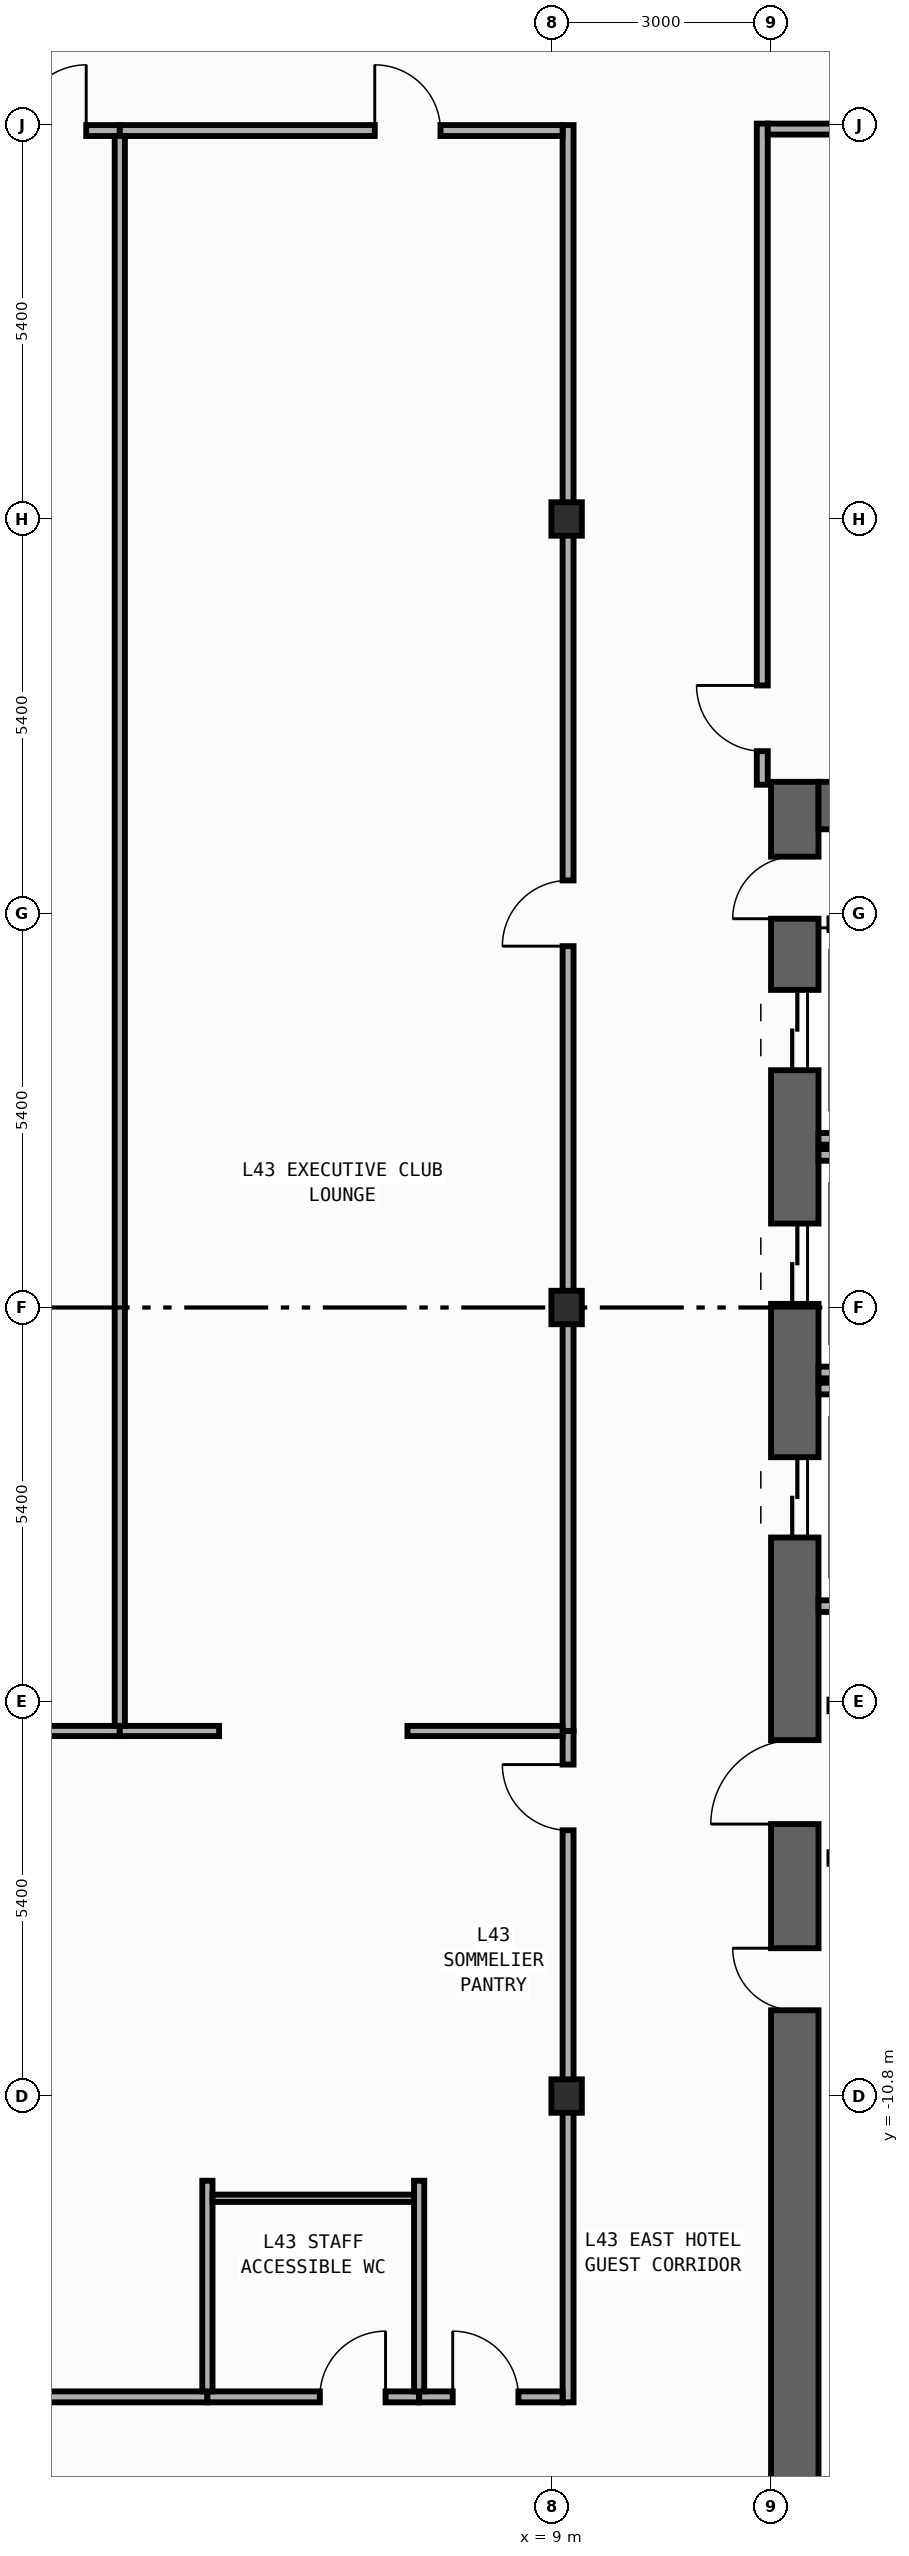
"""IFC4 building model, lengths in metres.
Left out: names, types, materials, properties, quantities, classifications, styles, units other than length and angle.
Written with IfcOpenShell. Run it as: python <this file> out.ifc"""

import sys

from ifc_helpers import new_model, si_unit, direction, frame, frame_2d, origin, origin_2d, place, context, subcontext, project, spatial, rectangle, i_section, extrude, element, fill, save


model = new_model("IFC4")
c1 = context("Model", 3, precision=1e-05, world=origin(), true_north=direction((0.0, 1.0)))
c2 = subcontext(c1, "Body", "Model", "MODEL_VIEW")
j1 = project(units=[si_unit("LENGTHUNIT", "METRE"), si_unit("PLANEANGLEUNIT", "RADIAN")], contexts=[c1])
p1 = place(None, origin())
s1 = spatial("IfcSite", under=j1, at=p1, CompositionType="ELEMENT")
p2 = place(p1, origin())
s2 = spatial("IfcBuilding", under=s1, at=p2, CompositionType="ELEMENT")
p3 = place(p2, frame((0.0, 0.0, 187.8)))
s3 = spatial("IfcBuildingStorey", under=s2, at=p3, CompositionType="ELEMENT", Elevation=187.8)
p4 = place(p3, frame((12.325, -19.8, 0.0), z_axis=(0.0, 0.0, 1.0), x_axis=(0.0, 1.0, 0.0)))
e1 = element("IfcWall", 1, at=p4, inside=s3, PredefinedType="SHEAR", context=c2, shape_type="SweptSolid", body=[
    extrude(rectangle(XDim=27.0, YDim=0.65, at=frame_2d((13.5, 0.0))), origin(), (0.0, 0.0, 1.0), 3.54),
])
p5 = place(p4, frame((23.05, 0.0, 0.0)))
e2 = element("IfcOpeningElement", 2, at=p5, cuts=e1, PredefinedType="OPENING", context=c2, shape_type="SweptSolid", body=[
    extrude(rectangle(XDim=1.1, YDim=2.2, at=frame_2d((0.55, 1.1))), frame((0.0, 0.335, 0.0), z_axis=(0.0, -1.0, 0.0), x_axis=(1.0, 0.0, 0.0)), (0.0, 0.0, 1.0), 0.67),
])
p6 = place(p4, frame((19.85, 0.0, 0.0)))
e3 = element("IfcOpeningElement", 3, at=p6, cuts=e1, PredefinedType="OPENING", context=c2, shape_type="SweptSolid", body=[
    extrude(rectangle(XDim=1.1, YDim=2.2, at=frame_2d((0.55, 1.1))), frame((0.0, 0.335, 0.0), z_axis=(0.0, -1.0, 0.0), x_axis=(1.0, 0.0, 0.0)), (0.0, 0.0, 1.0), 0.67),
])
p7 = place(p4, frame((16.65, 0.0, 0.0)))
e4 = element("IfcOpeningElement", 4, at=p7, cuts=e1, PredefinedType="OPENING", context=c2, shape_type="SweptSolid", body=[
    extrude(rectangle(XDim=1.1, YDim=2.2, at=frame_2d((0.55, 1.1))), frame((0.0, 0.335, 0.0), z_axis=(0.0, -1.0, 0.0), x_axis=(1.0, 0.0, 0.0)), (0.0, 0.0, 1.0), 0.67),
])
p8 = place(p4, frame((10.175, 0.0, 0.0)))
e5 = element("IfcOpeningElement", 5, at=p8, cuts=e1, PredefinedType="OPENING", context=c2, shape_type="SweptSolid", body=[
    extrude(rectangle(XDim=0.85, YDim=2.1, at=frame_2d((0.425, 1.05))), frame((0.0, 0.335, 0.0), z_axis=(0.0, -1.0, 0.0), x_axis=(1.0, 0.0, 0.0)), (0.0, 0.0, 1.0), 0.67),
])
p9 = place(p4, frame((12.725, 0.0, 0.0)))
e6 = element("IfcOpeningElement", 6, at=p9, cuts=e1, PredefinedType="OPENING", context=c2, shape_type="SweptSolid", body=[
    extrude(rectangle(XDim=1.15, YDim=2.2, at=frame_2d((0.575, 1.1))), frame((0.0, 0.335, 0.0), z_axis=(0.0, -1.0, 0.0), x_axis=(1.0, 0.0, 0.0)), (0.0, 0.0, 1.0), 0.67),
])
p10 = place(p4, frame((25.125, 0.0, 0.0)))
e7 = element("IfcOpeningElement", 7, at=p10, cuts=e1, PredefinedType="OPENING", context=c2, shape_type="SweptSolid", body=[
    extrude(rectangle(XDim=0.85, YDim=2.1, at=frame_2d((0.425, 1.05))), frame((0.0, 0.335, 0.0), z_axis=(0.0, -1.0, 0.0), x_axis=(1.0, 0.0, 0.0)), (0.0, 0.0, 1.0), 0.67),
])
p11 = place(p3, frame((12.65, 6.875, 0.0), z_axis=(0.0, 0.0, 1.0), x_axis=(1.0, 0.0, 0.0)))
e8 = element("IfcWall", 8, at=p11, inside=s3, PredefinedType="SHEAR", context=c2, shape_type="SweptSolid", body=[
    extrude(rectangle(XDim=7.1, YDim=0.65, at=frame_2d((3.55, 0.0))), origin(), (0.0, 0.0, 1.0), 3.54),
])
for number, where, z_axis, x_axis in (
    (9, (9.2, -10.8, 0.0), (0.0, 0.0, 1.0), (1.0, 0.0, 0.0)),
    (10, (9.2, 0.0, 0.0), (0.0, 0.0, 1.0), (1.0, 0.0, 0.0)),
    (11, (9.2, 10.8, 0.0), (0.0, 0.0, 1.0), (1.0, 0.0, 0.0)),
):
    element("IfcColumn", number, at=place(p3, frame(where, z_axis=z_axis, x_axis=x_axis)), inside=s3, PredefinedType="COLUMN", context=c2, shape_type="SweptSolid", body=[
        extrude(i_section(OverallWidth=0.417, OverallDepth=0.458, WebThickness=0.03, FlangeThickness=0.05, FilletRadius=0.022, at=origin_2d()), origin(), (0.0, 0.0, 1.0), 3.8),
    ])
for number, where, z_axis, x_axis in (
    (12, (12.65, 2.31, 0.0), (0.0, 0.0, 1.0), (1.0, 0.0, 0.0)),
    (13, (12.65, -0.89, 0.0), (0.0, 0.0, 1.0), (1.0, 0.0, 0.0)),
    (14, (12.65, 2.09, 0.0), (0.0, 0.0, 1.0), (1.0, 0.0, 0.0)),
    (15, (12.65, -4.09, 0.0), (0.0, 0.0, 1.0), (1.0, 0.0, 0.0)),
    (16, (12.65, -1.11, 0.0), (0.0, 0.0, 1.0), (1.0, 0.0, 0.0)),
):
    element("IfcWall", number, at=place(p3, frame(where, z_axis=z_axis, x_axis=x_axis)), inside=s3, PredefinedType="STANDARD", context=c2, shape_type="SweptSolid", body=[
        extrude(rectangle(XDim=2.34, YDim=0.16, at=frame_2d((1.17, 0.0))), origin(), (0.0, 0.0, 1.0), 3.54),
    ])
for number, where, z_axis, x_axis in (
    (17, (12.8, -5.45, 0.0), (0.0, 0.0, 1.0), (1.0, 0.0, 0.0)),
    (18, (12.8, -7.54, 0.0), (0.0, 0.0, 1.0), (1.0, 0.0, 0.0)),
    (19, (12.8, 5.25, 0.0), (0.0, 0.0, 1.0), (1.0, 0.0, 0.0)),
):
    element("IfcWall", number, at=place(p3, frame(where, z_axis=z_axis, x_axis=x_axis)), inside=s3, PredefinedType="STANDARD", context=c2, shape_type="SweptSolid", body=[
        extrude(rectangle(XDim=2.6, YDim=0.16, at=frame_2d((1.3, 0.0))), origin(), (0.0, 0.0, 1.0), 3.54),
    ])
p12 = place(p3, frame((9.22, -14.995, 0.0), z_axis=(0.0, 0.0, 1.0), x_axis=(0.0, 1.0, 0.0)))
e20 = element("IfcWall", 20, at=p12, inside=s3, PredefinedType="PARTITIONING", context=c2, shape_type="SweptSolid", body=[
    extrude(rectangle(XDim=9.195, YDim=0.15, at=frame_2d((4.598, 0.0))), origin(), (0.0, 0.0, 1.0), 2.952),
])
p13 = place(p12, frame((7.835, 0.0, 0.0)))
e21 = element("IfcOpeningElement", 21, at=p13, cuts=e20, PredefinedType="OPENING", context=c2, shape_type="SweptSolid", body=[
    extrude(rectangle(XDim=0.9, YDim=2.15, at=frame_2d((0.45, 1.075))), frame((0.0, 0.085, 0.0), z_axis=(0.0, -1.0, 0.0), x_axis=(1.0, 0.0, 0.0)), (0.0, 0.0, 1.0), 0.17),
])
p14 = place(p3, frame((9.22, -5.8, 0.0), z_axis=(0.0, 0.0, 1.0), x_axis=(0.0, 1.0, 0.0)))
e22 = element("IfcWall", 22, at=p14, inside=s3, PredefinedType="PARTITIONING", context=c2, shape_type="SweptSolid", body=[
    extrude(rectangle(XDim=21.995, YDim=0.15, at=frame_2d((10.998, 0.0))), origin(), (0.0, 0.0, 1.0), 2.952),
])
p15 = place(p14, frame((10.749, 0.0, 0.0)))
e23 = element("IfcOpeningElement", 23, at=p15, cuts=e22, PredefinedType="OPENING", context=c2, shape_type="SweptSolid", body=[
    extrude(rectangle(XDim=0.9, YDim=2.15, at=frame_2d((0.45, 1.075))), frame((0.0, 0.085, 0.0), z_axis=(0.0, -1.0, 0.0), x_axis=(1.0, 0.0, 0.0)), (0.0, 0.0, 1.0), 0.17),
])
p16 = place(p3, frame((11.88, 7.16, 0.0), z_axis=(0.0, 0.0, 1.0), x_axis=(0.0, 1.0, 0.0)))
e24 = element("IfcWall", 24, at=p16, inside=s3, PredefinedType="PARTITIONING", context=c2, shape_type="SweptSolid", body=[
    extrude(rectangle(XDim=9.055, YDim=0.15, at=frame_2d((4.528, 0.0))), origin(), (0.0, 0.0, 1.0), 3.54),
])
p17 = place(p16, frame((0.46, 0.0, 0.0)))
e25 = element("IfcOpeningElement", 25, at=p17, cuts=e24, PredefinedType="OPENING", context=c2, shape_type="SweptSolid", body=[
    extrude(rectangle(XDim=0.9, YDim=2.15, at=frame_2d((0.45, 1.075))), frame((0.0, 0.085, 0.0), z_axis=(0.0, -1.0, 0.0), x_axis=(1.0, 0.0, 0.0)), (0.0, 0.0, 1.0), 0.17),
])
p18 = place(p3, frame((-2.92, 16.12, 0.0), z_axis=(0.0, 0.0, 1.0), x_axis=(1.0, 0.0, 0.0)))
e26 = element("IfcWall", 26, at=p18, inside=s3, PredefinedType="PARTITIONING", context=c2, shape_type="SweptSolid", body=[
    extrude(rectangle(XDim=6.0, YDim=0.15, at=frame_2d((3.0, 0.0))), origin(), (0.0, 0.0, 1.0), 3.54),
])
p19 = place(p18, frame((4.64, 0.0, 0.0)))
e27 = element("IfcOpeningElement", 27, at=p19, cuts=e26, PredefinedType="OPENING", context=c2, shape_type="SweptSolid", body=[
    extrude(rectangle(XDim=0.9, YDim=2.15, at=frame_2d((0.45, 1.075))), frame((0.0, 0.085, 0.0), z_axis=(0.0, -1.0, 0.0), x_axis=(1.0, 0.0, 0.0)), (0.0, 0.0, 1.0), 0.17),
])
p20 = place(p3, frame((3.08, 16.12, 0.0), z_axis=(0.0, 0.0, 1.0), x_axis=(1.0, 0.0, 0.0)))
e28 = element("IfcWall", 28, at=p20, inside=s3, PredefinedType="PARTITIONING", context=c2, shape_type="SweptSolid", body=[
    extrude(rectangle(XDim=6.065, YDim=0.15, at=frame_2d((3.032, 0.0))), origin(), (0.0, 0.0, 1.0), 3.54),
])
p21 = place(p20, frame((3.492, 0.0, 0.0)))
e29 = element("IfcOpeningElement", 29, at=p21, cuts=e28, PredefinedType="OPENING", context=c2, shape_type="SweptSolid", body=[
    extrude(rectangle(XDim=0.9, YDim=2.15, at=frame_2d((0.45, 1.075))), frame((0.0, 0.085, 0.0), z_axis=(0.0, -1.0, 0.0), x_axis=(1.0, 0.0, 0.0)), (0.0, 0.0, 1.0), 0.17),
])
p22 = place(p3, frame((11.955, 16.14, 0.0), z_axis=(0.0, 0.0, 1.0), x_axis=(1.0, 0.0, 0.0)))
e30 = element("IfcWall", 30, at=p22, inside=s3, PredefinedType="PARTITIONING", context=c2, shape_type="SweptSolid", body=[
    extrude(rectangle(XDim=10.5, YDim=0.15, at=frame_2d((5.25, 0.0))), origin(), (0.0, 0.0, 1.0), 3.54),
])
p23 = place(p22, frame((4.901, 0.0, 0.0)))
e31 = element("IfcOpeningElement", 31, at=p23, cuts=e30, PredefinedType="OPENING", context=c2, shape_type="SweptSolid", body=[
    extrude(rectangle(XDim=0.9, YDim=2.15, at=frame_2d((0.45, 1.075))), frame((0.0, 0.085, 0.0), z_axis=(0.0, -1.0, 0.0), x_axis=(1.0, 0.0, 0.0)), (0.0, 0.0, 1.0), 0.17),
])
p24 = place(p3, frame((-3.32, -14.92, 0.0), z_axis=(0.0, 0.0, 1.0), x_axis=(1.0, 0.0, 0.0)))
e32 = element("IfcWall", 32, at=p24, inside=s3, PredefinedType="PARTITIONING", context=c2, shape_type="SweptSolid", body=[
    extrude(rectangle(XDim=7.6, YDim=0.15, at=frame_2d((3.8, 0.0))), origin(), (0.0, 0.0, 1.0), 3.54),
])
p25 = place(p24, frame((0.667, 0.0, 0.0)))
e33 = element("IfcOpeningElement", 33, at=p25, cuts=e32, PredefinedType="OPENING", context=c2, shape_type="SweptSolid", body=[
    extrude(rectangle(XDim=0.9, YDim=2.15, at=frame_2d((0.45, 1.075))), frame((0.0, 0.085, 0.0), z_axis=(0.0, -1.0, 0.0), x_axis=(1.0, 0.0, 0.0)), (0.0, 0.0, 1.0), 0.17),
])
p26 = place(p3, frame((4.28, -14.92, 0.0), z_axis=(0.0, 0.0, 1.0), x_axis=(1.0, 0.0, 0.0)))
e34 = element("IfcWall", 34, at=p26, inside=s3, PredefinedType="PARTITIONING", context=c2, shape_type="SweptSolid", body=[
    extrude(rectangle(XDim=2.9, YDim=0.15, at=frame_2d((1.45, 0.0))), origin(), (0.0, 0.0, 1.0), 3.54),
])
p27 = place(p26, frame((1.54, 0.0, 0.0)))
e35 = element("IfcOpeningElement", 35, at=p27, cuts=e34, PredefinedType="OPENING", context=c2, shape_type="SweptSolid", body=[
    extrude(rectangle(XDim=0.9, YDim=2.15, at=frame_2d((0.45, 1.075))), frame((0.0, 0.085, 0.0), z_axis=(0.0, -1.0, 0.0), x_axis=(1.0, 0.0, 0.0)), (0.0, 0.0, 1.0), 0.17),
])
p28 = place(p3, frame((7.18, -14.92, 0.0), z_axis=(0.0, 0.0, 1.0), x_axis=(1.0, 0.0, 0.0)))
e36 = element("IfcWall", 36, at=p28, inside=s3, PredefinedType="PARTITIONING", context=c2, shape_type="SweptSolid", body=[
    extrude(rectangle(XDim=1.965, YDim=0.15, at=frame_2d((0.982, 0.0))), origin(), (0.0, 0.0, 1.0), 3.54),
])
p29 = place(p28, frame((0.46, 0.0, 0.0)))
e37 = element("IfcOpeningElement", 37, at=p29, cuts=e36, PredefinedType="OPENING", context=c2, shape_type="SweptSolid", body=[
    extrude(rectangle(XDim=0.9, YDim=2.15, at=frame_2d((0.45, 1.075))), frame((0.0, 0.085, 0.0), z_axis=(0.0, -1.0, 0.0), x_axis=(1.0, 0.0, 0.0)), (0.0, 0.0, 1.0), 0.17),
])
p30 = place(p3, frame((4.28, -14.845, 0.0), z_axis=(0.0, 0.0, 1.0), x_axis=(0.0, 1.0, 0.0)))
e38 = element("IfcWall", 38, at=p30, inside=s3, PredefinedType="PARTITIONING", context=c2, shape_type="SweptSolid", body=[
    extrude(rectangle(XDim=2.885, YDim=0.14, at=frame_2d((1.442, 0.0))), origin(), (0.0, 0.0, 1.0), 3.54),
])
p31 = place(p3, frame((-2.99, -5.8, 0.0), z_axis=(0.0, 0.0, 1.0), x_axis=(1.0, 0.0, 0.0)))
e39 = element("IfcWall", 39, at=p31, inside=s3, PredefinedType="PARTITIONING", context=c2, shape_type="SweptSolid", body=[
    extrude(rectangle(XDim=6.07, YDim=0.14, at=frame_2d((3.035, 0.0))), origin(), (0.0, 0.0, 1.0), 3.54),
])
p32 = place(p3, frame((3.08, -5.8, 0.0), z_axis=(0.0, 0.0, 1.0), x_axis=(1.0, 0.0, 0.0)))
e40 = element("IfcWall", 40, at=p32, inside=s3, PredefinedType="PARTITIONING", context=c2, shape_type="SweptSolid", body=[
    extrude(rectangle(XDim=1.36, YDim=0.14, at=frame_2d((0.68, 0.0))), origin(), (0.0, 0.0, 1.0), 3.54),
])
p33 = place(p3, frame((7.18, -14.845, 0.0), z_axis=(0.0, 0.0, 1.0), x_axis=(0.0, 1.0, 0.0)))
e41 = element("IfcWall", 41, at=p33, inside=s3, PredefinedType="PARTITIONING", context=c2, shape_type="SweptSolid", body=[
    extrude(rectangle(XDim=2.885, YDim=0.14, at=frame_2d((1.442, 0.0))), origin(), (0.0, 0.0, 1.0), 3.54),
])
p34 = place(p3, frame((7.02, -5.8, 0.0), z_axis=(0.0, 0.0, 1.0), x_axis=(1.0, 0.0, 0.0)))
e42 = element("IfcWall", 42, at=p34, inside=s3, PredefinedType="PARTITIONING", context=c2, shape_type="SweptSolid", body=[
    extrude(rectangle(XDim=2.125, YDim=0.14, at=frame_2d((1.062, 0.0))), origin(), (0.0, 0.0, 1.0), 3.54),
])
p35 = place(p3, frame((3.08, -5.73, 0.0), z_axis=(0.0, 0.0, 1.0), x_axis=(0.0, 1.0, 0.0)))
e43 = element("IfcWall", 43, at=p35, inside=s3, PredefinedType="PARTITIONING", context=c2, shape_type="SweptSolid", body=[
    extrude(rectangle(XDim=21.775, YDim=0.14, at=frame_2d((10.887, 0.0))), origin(), (0.0, 0.0, 1.0), 3.54),
])
p36 = place(p3, frame((4.35, -12.2, 0.0), z_axis=(0.0, 0.0, 1.0), x_axis=(1.0, 0.0, 0.0)))
e44 = element("IfcWall", 44, at=p36, inside=s3, PredefinedType="PARTITIONING", context=c2, shape_type="SweptSolid", body=[
    extrude(rectangle(XDim=2.76, YDim=0.1, at=frame_2d((1.38, 0.0))), origin(), (0.0, 0.0, 1.0), 3.54),
])
p37 = place(p5, origin())
e45 = element("IfcDoor", 45, at=p37, inside=s3, OperationType="DOUBLE_DOOR_SLIDING", PredefinedType="DOOR", context=c2, shape_type="SweptSolid", body=[
    extrude(rectangle(XDim=1.1, YDim=2.2, at=frame_2d((0.55, 1.1))), frame((0.0, 0.025, 0.0), z_axis=(0.0, -1.0, 0.0), x_axis=(1.0, 0.0, 0.0)), (0.0, 0.0, 1.0), 0.05),
])
fill(e2, e45)
p38 = place(p6, origin())
e46 = element("IfcDoor", 46, at=p38, inside=s3, OperationType="DOUBLE_DOOR_SLIDING", PredefinedType="DOOR", context=c2, shape_type="SweptSolid", body=[
    extrude(rectangle(XDim=1.1, YDim=2.2, at=frame_2d((0.55, 1.1))), frame((0.0, 0.025, 0.0), z_axis=(0.0, -1.0, 0.0), x_axis=(1.0, 0.0, 0.0)), (0.0, 0.0, 1.0), 0.05),
])
fill(e3, e46)
p39 = place(p7, origin())
e47 = element("IfcDoor", 47, at=p39, inside=s3, OperationType="DOUBLE_DOOR_SLIDING", PredefinedType="DOOR", context=c2, shape_type="SweptSolid", body=[
    extrude(rectangle(XDim=1.1, YDim=2.2, at=frame_2d((0.55, 1.1))), frame((0.0, 0.025, 0.0), z_axis=(0.0, -1.0, 0.0), x_axis=(1.0, 0.0, 0.0)), (0.0, 0.0, 1.0), 0.05),
])
fill(e4, e47)
p40 = place(p8, origin())
e48 = element("IfcDoor", 48, at=p40, inside=s3, OperationType="SINGLE_SWING_RIGHT", PredefinedType="DOOR", context=c2, shape_type="SweptSolid", body=[
    extrude(rectangle(XDim=0.85, YDim=2.1, at=frame_2d((0.425, 1.05))), frame((0.0, 0.025, 0.0), z_axis=(0.0, -1.0, 0.0), x_axis=(1.0, 0.0, 0.0)), (0.0, 0.0, 1.0), 0.05),
])
fill(e5, e48)
p41 = place(p9, origin())
e49 = element("IfcDoor", 49, at=p41, inside=s3, OperationType="SINGLE_SWING_LEFT", PredefinedType="DOOR", context=c2, shape_type="SweptSolid", body=[
    extrude(rectangle(XDim=1.15, YDim=2.2, at=frame_2d((0.575, 1.1))), frame((0.0, 0.025, 0.0), z_axis=(0.0, -1.0, 0.0), x_axis=(1.0, 0.0, 0.0)), (0.0, 0.0, 1.0), 0.05),
])
fill(e6, e49)
p42 = place(p10, origin())
e50 = element("IfcDoor", 50, at=p42, inside=s3, OperationType="SINGLE_SWING_LEFT", PredefinedType="DOOR", context=c2, shape_type="SweptSolid", body=[
    extrude(rectangle(XDim=0.85, YDim=2.1, at=frame_2d((0.425, 1.05))), frame((0.0, 0.025, 0.0), z_axis=(0.0, -1.0, 0.0), x_axis=(1.0, 0.0, 0.0)), (0.0, 0.0, 1.0), 0.05),
])
fill(e7, e50)
p43 = place(p13, origin())
e51 = element("IfcDoor", 51, at=p43, inside=s3, OperationType="SINGLE_SWING_RIGHT", PredefinedType="DOOR", context=c2, shape_type="SweptSolid", body=[
    extrude(rectangle(XDim=0.9, YDim=2.15, at=frame_2d((0.45, 1.075))), frame((0.0, 0.025, 0.0), z_axis=(0.0, -1.0, 0.0), x_axis=(1.0, 0.0, 0.0)), (0.0, 0.0, 1.0), 0.05),
])
fill(e21, e51)
p44 = place(p15, origin())
e52 = element("IfcDoor", 52, at=p44, inside=s3, OperationType="SINGLE_SWING_LEFT", PredefinedType="DOOR", context=c2, shape_type="SweptSolid", body=[
    extrude(rectangle(XDim=0.9, YDim=2.15, at=frame_2d((0.45, 1.075))), frame((0.0, 0.025, 0.0), z_axis=(0.0, -1.0, 0.0), x_axis=(1.0, 0.0, 0.0)), (0.0, 0.0, 1.0), 0.05),
])
fill(e23, e52)
p45 = place(p17, origin())
e53 = element("IfcDoor", 53, at=p45, inside=s3, OperationType="SINGLE_SWING_RIGHT", PredefinedType="DOOR", context=c2, shape_type="SweptSolid", body=[
    extrude(rectangle(XDim=0.9, YDim=2.15, at=frame_2d((0.45, 1.075))), frame((0.0, 0.025, 0.0), z_axis=(0.0, -1.0, 0.0), x_axis=(1.0, 0.0, 0.0)), (0.0, 0.0, 1.0), 0.05),
])
fill(e25, e53)
p46 = place(p19, origin())
e54 = element("IfcDoor", 54, at=p46, inside=s3, OperationType="SINGLE_SWING_RIGHT", PredefinedType="DOOR", context=c2, shape_type="SweptSolid", body=[
    extrude(rectangle(XDim=0.9, YDim=2.15, at=frame_2d((0.45, 1.075))), frame((0.0, 0.025, 0.0), z_axis=(0.0, -1.0, 0.0), x_axis=(1.0, 0.0, 0.0)), (0.0, 0.0, 1.0), 0.05),
])
fill(e27, e54)
p47 = place(p21, origin())
e55 = element("IfcDoor", 55, at=p47, inside=s3, OperationType="SINGLE_SWING_LEFT", PredefinedType="DOOR", context=c2, shape_type="SweptSolid", body=[
    extrude(rectangle(XDim=0.9, YDim=2.15, at=frame_2d((0.45, 1.075))), frame((0.0, 0.025, 0.0), z_axis=(0.0, -1.0, 0.0), x_axis=(1.0, 0.0, 0.0)), (0.0, 0.0, 1.0), 0.05),
])
fill(e29, e55)
p48 = place(p27, origin())
e56 = element("IfcDoor", 56, at=p48, inside=s3, OperationType="SINGLE_SWING_RIGHT", PredefinedType="DOOR", context=c2, shape_type="SweptSolid", body=[
    extrude(rectangle(XDim=0.9, YDim=2.15, at=frame_2d((0.45, 1.075))), frame((0.0, 0.025, 0.0), z_axis=(0.0, -1.0, 0.0), x_axis=(1.0, 0.0, 0.0)), (0.0, 0.0, 1.0), 0.05),
])
fill(e35, e56)
p49 = place(p29, origin())
e57 = element("IfcDoor", 57, at=p49, inside=s3, OperationType="SINGLE_SWING_LEFT", PredefinedType="DOOR", context=c2, shape_type="SweptSolid", body=[
    extrude(rectangle(XDim=0.9, YDim=2.15, at=frame_2d((0.45, 1.075))), frame((0.0, 0.025, 0.0), z_axis=(0.0, -1.0, 0.0), x_axis=(1.0, 0.0, 0.0)), (0.0, 0.0, 1.0), 0.05),
])
fill(e37, e57)
save(model, sys.argv[1])
